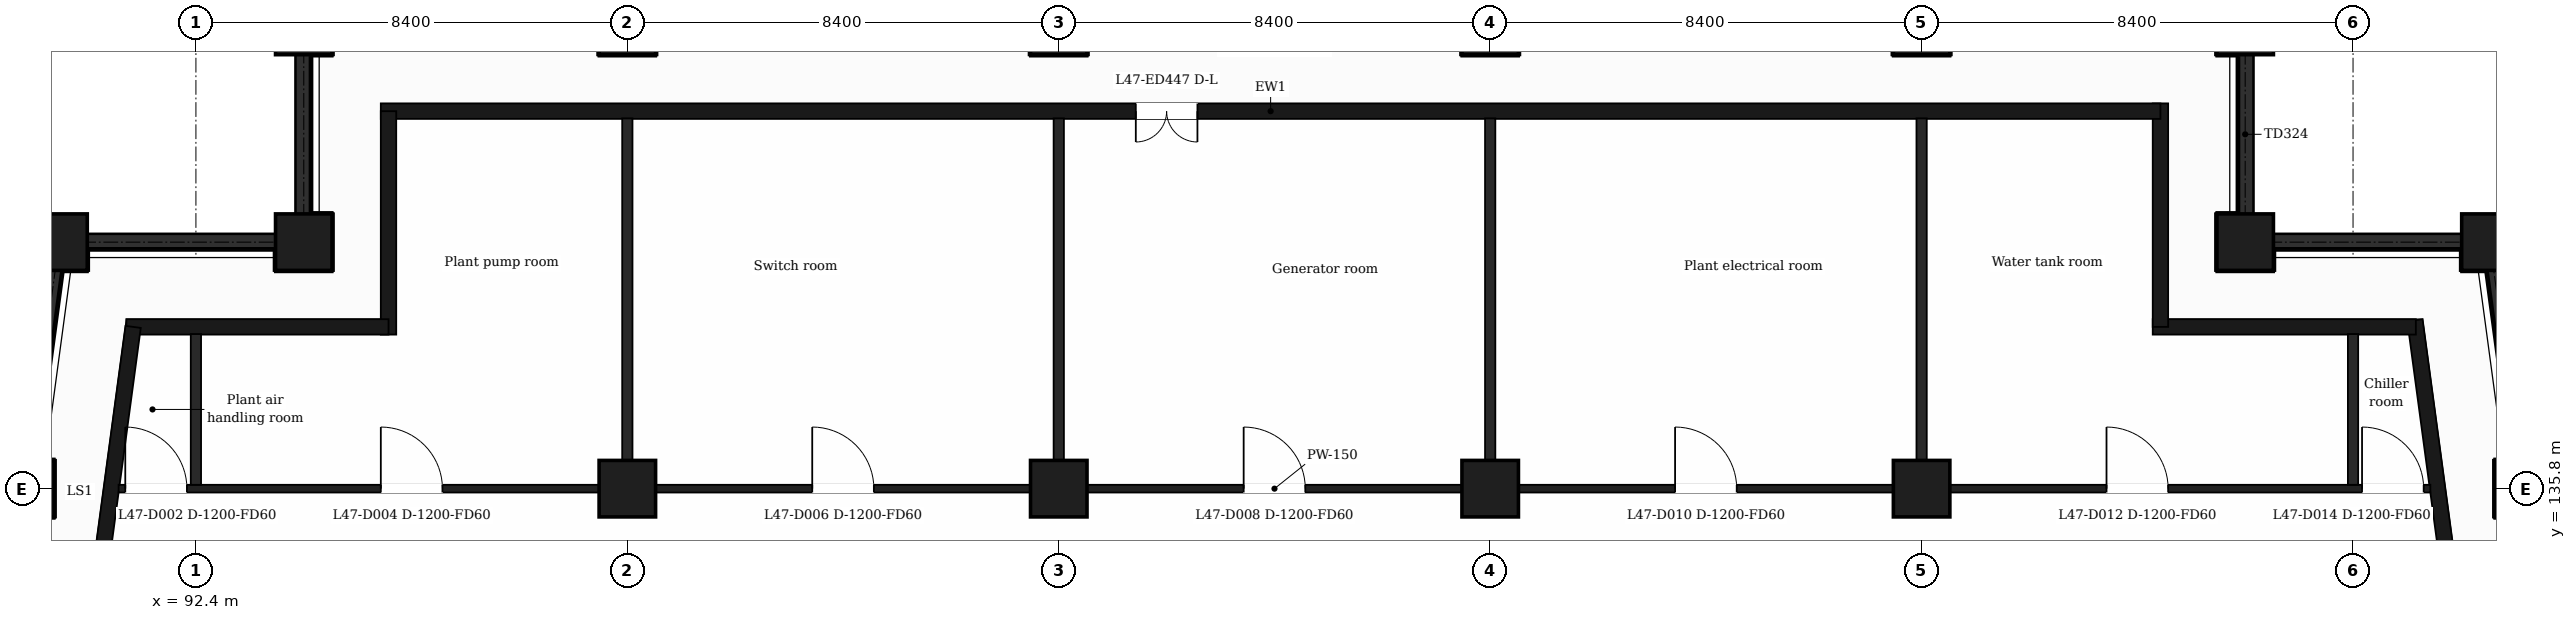
"""IFC4 building model, lengths in metres.
Left out: names, types, materials, properties, quantities, classifications, styles, units other than length and angle.
Written with IfcOpenShell. Run it as: python <this file> out.ifc"""

import sys

from ifc_helpers import new_model, si_unit, direction, frame, frame_2d, origin, origin_2d, place, context, subcontext, project, spatial, rectangle, extrude, element, fill, save


model = new_model("IFC4")
c1 = context("Model", 3, precision=1e-05, world=origin(), true_north=direction((0.0, 1.0)))
c2 = subcontext(c1, "Body", "Model", "MODEL_VIEW")
j1 = project(units=[si_unit("LENGTHUNIT", "METRE"), si_unit("PLANEANGLEUNIT", "RADIAN")], contexts=[c1])
p1 = place(None, origin())
s1 = spatial("IfcSite", under=j1, at=p1, CompositionType="ELEMENT")
p2 = place(p1, origin())
s2 = spatial("IfcBuilding", under=s1, at=p2, CompositionType="ELEMENT")
p3 = place(p2, frame((0.0, 0.0, 197.2)))
s3 = spatial("IfcBuildingStorey", under=s2, at=p3, CompositionType="ELEMENT", Elevation=197.2)
for number, where, z_axis, x_axis in (
    (1, (94.5, 140.6, 0.0), (0.0, 0.0, 1.0), (1.0, 0.0, 0.0)),
    (2, (132.3, 140.6, 0.0), (0.0, 0.0, 1.0), (1.0, 0.0, 0.0)),
    (3, (89.735, 140.6, 0.0), (0.0, 0.0, 1.0), (1.0, 0.0, 0.0)),
    (4, (137.065, 140.6, 0.0), (0.0, 0.0, 1.0), (1.0, 0.0, 0.0)),
    (5, (100.8, 135.8, 0.0), (0.0, 0.0, 1.0), (1.0, 0.0, 0.0)),
    (6, (109.2, 135.8, 0.0), (0.0, 0.0, 1.0), (1.0, 0.0, 0.0)),
    (7, (117.6, 135.8, 0.0), (0.0, 0.0, 1.0), (1.0, 0.0, 0.0)),
    (8, (126.0, 135.8, 0.0), (0.0, 0.0, 1.0), (1.0, 0.0, 0.0)),
    (9, (89.088, 135.8, 0.0), (0.0, 0.0, 1.0), (1.0, 0.0, 0.0)),
    (10, (137.711, 135.8, 0.0), (0.0, 0.0, 1.0), (1.0, 0.0, 0.0)),
    (11, (100.8, 144.8, 0.0), (0.0, 0.0, 1.0), (1.0, 0.0, 0.0)),
    (12, (109.2, 144.8, 0.0), (0.0, 0.0, 1.0), (1.0, 0.0, 0.0)),
    (13, (117.6, 144.8, 0.0), (0.0, 0.0, 1.0), (1.0, 0.0, 0.0)),
    (14, (126.0, 144.8, 0.0), (0.0, 0.0, 1.0), (1.0, 0.0, 0.0)),
    (15, (94.5, 144.8, 0.0), (0.0, 0.0, 1.0), (1.0, 0.0, 0.0)),
    (16, (132.3, 144.8, 0.0), (0.0, 0.0, 1.0), (1.0, 0.0, 0.0)),
):
    element("IfcColumn", number, at=place(p3, frame(where, z_axis=z_axis, x_axis=x_axis)), inside=s3, PredefinedType="COLUMN", context=c2, shape_type="SweptSolid", body=[
        extrude(rectangle(XDim=1.1, YDim=1.1, at=origin_2d()), origin(), (0.0, 0.0, 1.0), 5.0),
    ])
p4 = place(p3, frame((136.504, 132.4, 0.0), z_axis=(0.0, 0.0, 1.0), x_axis=(-0.133399697462, 0.99106231929, 0.0)))
e17 = element("IfcWall", 17, at=p4, inside=s3, PredefinedType="SOLIDWALL", context=c2, shape_type="SweptSolid", body=[
    extrude(rectangle(XDim=6.74, YDim=0.3, at=frame_2d((3.37, 0.0))), origin(), (0.0, 0.0, 1.0), 4.68),
])
p5 = place(p4, frame((1.115, 0.0, 0.0)))
e18 = element("IfcOpeningElement", 18, at=p5, cuts=e17, PredefinedType="OPENING", context=c2, shape_type="SweptSolid", body=[
    extrude(rectangle(XDim=1.2, YDim=2.4, at=frame_2d((0.6, 1.2))), frame((0.0, 0.16, 0.0), z_axis=(0.0, -1.0, 0.0), x_axis=(1.0, 0.0, 0.0)), (0.0, 0.0, 1.0), 0.32),
])
p6 = place(p3, frame((135.623, 138.95, 0.0), z_axis=(0.0, 0.0, 1.0), x_axis=(-1.0, 0.0, 0.0)))
e19 = element("IfcWall", 19, at=p6, inside=s3, PredefinedType="SOLIDWALL", context=c2, shape_type="SweptSolid", body=[
    extrude(rectangle(XDim=5.123, YDim=0.3, at=frame_2d((2.561, 0.0))), origin(), (0.0, 0.0, 1.0), 4.68),
])
p7 = place(p3, frame((130.65, 138.95, 0.0), z_axis=(0.0, 0.0, 1.0), x_axis=(0.0, 1.0, 0.0)))
e20 = element("IfcWall", 20, at=p7, inside=s3, PredefinedType="SOLIDWALL", context=c2, shape_type="SweptSolid", body=[
    extrude(rectangle(XDim=4.35, YDim=0.3, at=frame_2d((2.175, 0.0))), origin(), (0.0, 0.0, 1.0), 4.68),
])
p8 = place(p3, frame((130.65, 143.15, 0.0), z_axis=(0.0, 0.0, 1.0), x_axis=(-1.0, 0.0, 0.0)))
e21 = element("IfcWall", 21, at=p8, inside=s3, PredefinedType="SOLIDWALL", context=c2, shape_type="SweptSolid", body=[
    extrude(rectangle(XDim=34.65, YDim=0.3, at=frame_2d((17.325, 0.0))), origin(), (0.0, 0.0, 1.0), 4.68),
])
p9 = place(p8, frame((18.75, 0.0, 0.0)))
e22 = element("IfcOpeningElement", 22, at=p9, cuts=e21, PredefinedType="OPENING", context=c2, shape_type="SweptSolid", body=[
    extrude(rectangle(XDim=1.2, YDim=2.4, at=frame_2d((0.6, 1.2))), frame((0.0, 0.16, 0.0), z_axis=(0.0, -1.0, 0.0), x_axis=(1.0, 0.0, 0.0)), (0.0, 0.0, 1.0), 0.32),
])
p10 = place(p3, frame((96.15, 143.15, 0.0), z_axis=(0.0, 0.0, 1.0), x_axis=(0.0, -1.0, 0.0)))
e23 = element("IfcWall", 23, at=p10, inside=s3, PredefinedType="SOLIDWALL", context=c2, shape_type="SweptSolid", body=[
    extrude(rectangle(XDim=4.35, YDim=0.3, at=frame_2d((2.175, 0.0))), origin(), (0.0, 0.0, 1.0), 4.68),
])
p11 = place(p3, frame((96.15, 138.95, 0.0), z_axis=(0.0, 0.0, 1.0), x_axis=(-1.0, 0.0, 0.0)))
e24 = element("IfcWall", 24, at=p11, inside=s3, PredefinedType="SOLIDWALL", context=c2, shape_type="SweptSolid", body=[
    extrude(rectangle(XDim=5.104, YDim=0.3, at=frame_2d((2.552, 0.0))), origin(), (0.0, 0.0, 1.0), 4.68),
])
p12 = place(p3, frame((91.177, 138.95, 0.0), z_axis=(0.0, 0.0, 1.0), x_axis=(-0.133426664613, -0.991058689065, 0.0)))
e25 = element("IfcWall", 25, at=p12, inside=s3, PredefinedType="SOLIDWALL", context=c2, shape_type="SweptSolid", body=[
    extrude(rectangle(XDim=6.609, YDim=0.3, at=frame_2d((3.305, 0.0))), origin(), (0.0, 0.0, 1.0), 4.68),
])
p13 = place(p12, frame((4.294, 0.0, 0.0)))
e26 = element("IfcOpeningElement", 26, at=p13, cuts=e25, PredefinedType="OPENING", context=c2, shape_type="SweptSolid", body=[
    extrude(rectangle(XDim=1.2, YDim=2.4, at=frame_2d((0.6, 1.2))), frame((0.0, 0.16, 0.0), z_axis=(0.0, -1.0, 0.0), x_axis=(1.0, 0.0, 0.0)), (0.0, 0.0, 1.0), 0.32),
])
p14 = place(p3, frame((90.895, 135.8, 0.0), z_axis=(0.0, 0.0, 1.0), x_axis=(1.0, 0.0, 0.0)))
e27 = element("IfcWall", 27, at=p14, inside=s3, PredefinedType="PARTITIONING", context=c2, shape_type="SweptSolid", body=[
    extrude(rectangle(XDim=45.011, YDim=0.15, at=frame_2d((22.505, 0.0))), origin(), (0.0, 0.0, 1.0), 4.68),
])
p15 = place(p14, frame((0.13, 0.0, 0.0)))
e28 = element("IfcOpeningElement", 28, at=p15, cuts=e27, PredefinedType="OPENING", context=c2, shape_type="SweptSolid", body=[
    extrude(rectangle(XDim=1.2, YDim=2.1, at=frame_2d((0.6, 1.05))), frame((0.0, 0.085, 0.0), z_axis=(0.0, -1.0, 0.0), x_axis=(1.0, 0.0, 0.0)), (0.0, 0.0, 1.0), 0.17),
])
p16 = place(p14, frame((5.105, 0.0, 0.0)))
e29 = element("IfcOpeningElement", 29, at=p16, cuts=e27, PredefinedType="OPENING", context=c2, shape_type="SweptSolid", body=[
    extrude(rectangle(XDim=1.2, YDim=2.1, at=frame_2d((0.6, 1.05))), frame((0.0, 0.085, 0.0), z_axis=(0.0, -1.0, 0.0), x_axis=(1.0, 0.0, 0.0)), (0.0, 0.0, 1.0), 0.17),
])
p17 = place(p14, frame((13.505, 0.0, 0.0)))
e30 = element("IfcOpeningElement", 30, at=p17, cuts=e27, PredefinedType="OPENING", context=c2, shape_type="SweptSolid", body=[
    extrude(rectangle(XDim=1.2, YDim=2.1, at=frame_2d((0.6, 1.05))), frame((0.0, 0.085, 0.0), z_axis=(0.0, -1.0, 0.0), x_axis=(1.0, 0.0, 0.0)), (0.0, 0.0, 1.0), 0.17),
])
p18 = place(p14, frame((21.906, 0.0, 0.0)))
e31 = element("IfcOpeningElement", 31, at=p18, cuts=e27, PredefinedType="OPENING", context=c2, shape_type="SweptSolid", body=[
    extrude(rectangle(XDim=1.2, YDim=2.1, at=frame_2d((0.6, 1.05))), frame((0.0, 0.085, 0.0), z_axis=(0.0, -1.0, 0.0), x_axis=(1.0, 0.0, 0.0)), (0.0, 0.0, 1.0), 0.17),
])
p19 = place(p14, frame((30.305, 0.0, 0.0)))
e32 = element("IfcOpeningElement", 32, at=p19, cuts=e27, PredefinedType="OPENING", context=c2, shape_type="SweptSolid", body=[
    extrude(rectangle(XDim=1.2, YDim=2.1, at=frame_2d((0.6, 1.05))), frame((0.0, 0.085, 0.0), z_axis=(0.0, -1.0, 0.0), x_axis=(1.0, 0.0, 0.0)), (0.0, 0.0, 1.0), 0.17),
])
p20 = place(p14, frame((38.705, 0.0, 0.0)))
e33 = element("IfcOpeningElement", 33, at=p20, cuts=e27, PredefinedType="OPENING", context=c2, shape_type="SweptSolid", body=[
    extrude(rectangle(XDim=1.2, YDim=2.1, at=frame_2d((0.6, 1.05))), frame((0.0, 0.085, 0.0), z_axis=(0.0, -1.0, 0.0), x_axis=(1.0, 0.0, 0.0)), (0.0, 0.0, 1.0), 0.17),
])
p21 = place(p14, frame((43.681, 0.0, 0.0)))
e34 = element("IfcOpeningElement", 34, at=p21, cuts=e27, PredefinedType="OPENING", context=c2, shape_type="SweptSolid", body=[
    extrude(rectangle(XDim=1.2, YDim=2.1, at=frame_2d((0.6, 1.05))), frame((0.0, 0.085, 0.0), z_axis=(0.0, -1.0, 0.0), x_axis=(1.0, 0.0, 0.0)), (0.0, 0.0, 1.0), 0.17),
])
p22 = place(p3, frame((92.4, 135.875, 0.0), z_axis=(0.0, 0.0, 1.0), x_axis=(0.0, 1.0, 0.0)))
e35 = element("IfcWall", 35, at=p22, inside=s3, PredefinedType="PARTITIONING", context=c2, shape_type="SweptSolid", body=[
    extrude(rectangle(XDim=2.935, YDim=0.2, at=frame_2d((1.468, 0.0))), origin(), (0.0, 0.0, 1.0), 4.68),
])
for number, where, z_axis, x_axis in (
    (36, (100.8, 135.875, 0.0), (0.0, 0.0, 1.0), (0.0, 1.0, 0.0)),
    (37, (109.2, 135.875, 0.0), (0.0, 0.0, 1.0), (0.0, 1.0, 0.0)),
    (38, (117.6, 135.875, 0.0), (0.0, 0.0, 1.0), (0.0, 1.0, 0.0)),
    (39, (126.0, 135.875, 0.0), (0.0, 0.0, 1.0), (0.0, 1.0, 0.0)),
):
    element("IfcWall", number, at=place(p3, frame(where, z_axis=z_axis, x_axis=x_axis)), inside=s3, PredefinedType="PARTITIONING", context=c2, shape_type="SweptSolid", body=[
        extrude(rectangle(XDim=7.135, YDim=0.2, at=frame_2d((3.567, 0.0))), origin(), (0.0, 0.0, 1.0), 4.68),
    ])
p23 = place(p3, frame((134.4, 135.875, 0.0), z_axis=(0.0, 0.0, 1.0), x_axis=(0.0, 1.0, 0.0)))
e40 = element("IfcWall", 40, at=p23, inside=s3, PredefinedType="PARTITIONING", context=c2, shape_type="SweptSolid", body=[
    extrude(rectangle(XDim=2.935, YDim=0.2, at=frame_2d((1.468, 0.0))), origin(), (0.0, 0.0, 1.0), 4.68),
])
p24 = place(p9, origin())
e41 = element("IfcDoor", 41, at=p24, inside=s3, OperationType="DOUBLE_DOOR_SINGLE_SWING", PredefinedType="DOOR", context=c2, shape_type="SweptSolid", body=[
    extrude(rectangle(XDim=1.2, YDim=2.4, at=frame_2d((0.6, 1.2))), frame((0.0, 0.025, 0.0), z_axis=(0.0, -1.0, 0.0), x_axis=(1.0, 0.0, 0.0)), (0.0, 0.0, 1.0), 0.05),
])
fill(e22, e41)
p25 = place(p15, origin())
e42 = element("IfcDoor", 42, at=p25, inside=s3, OperationType="SINGLE_SWING_LEFT", PredefinedType="DOOR", context=c2, shape_type="SweptSolid", body=[
    extrude(rectangle(XDim=1.2, YDim=2.1, at=frame_2d((0.6, 1.05))), frame((0.0, 0.025, 0.0), z_axis=(0.0, -1.0, 0.0), x_axis=(1.0, 0.0, 0.0)), (0.0, 0.0, 1.0), 0.05),
])
fill(e28, e42)
p26 = place(p16, origin())
e43 = element("IfcDoor", 43, at=p26, inside=s3, OperationType="SINGLE_SWING_LEFT", PredefinedType="DOOR", context=c2, shape_type="SweptSolid", body=[
    extrude(rectangle(XDim=1.2, YDim=2.1, at=frame_2d((0.6, 1.05))), frame((0.0, 0.025, 0.0), z_axis=(0.0, -1.0, 0.0), x_axis=(1.0, 0.0, 0.0)), (0.0, 0.0, 1.0), 0.05),
])
fill(e29, e43)
p27 = place(p17, origin())
e44 = element("IfcDoor", 44, at=p27, inside=s3, OperationType="SINGLE_SWING_LEFT", PredefinedType="DOOR", context=c2, shape_type="SweptSolid", body=[
    extrude(rectangle(XDim=1.2, YDim=2.1, at=frame_2d((0.6, 1.05))), frame((0.0, 0.025, 0.0), z_axis=(0.0, -1.0, 0.0), x_axis=(1.0, 0.0, 0.0)), (0.0, 0.0, 1.0), 0.05),
])
fill(e30, e44)
p28 = place(p18, origin())
e45 = element("IfcDoor", 45, at=p28, inside=s3, OperationType="SINGLE_SWING_LEFT", PredefinedType="DOOR", context=c2, shape_type="SweptSolid", body=[
    extrude(rectangle(XDim=1.2, YDim=2.1, at=frame_2d((0.6, 1.05))), frame((0.0, 0.025, 0.0), z_axis=(0.0, -1.0, 0.0), x_axis=(1.0, 0.0, 0.0)), (0.0, 0.0, 1.0), 0.05),
])
fill(e31, e45)
p29 = place(p19, origin())
e46 = element("IfcDoor", 46, at=p29, inside=s3, OperationType="SINGLE_SWING_LEFT", PredefinedType="DOOR", context=c2, shape_type="SweptSolid", body=[
    extrude(rectangle(XDim=1.2, YDim=2.1, at=frame_2d((0.6, 1.05))), frame((0.0, 0.025, 0.0), z_axis=(0.0, -1.0, 0.0), x_axis=(1.0, 0.0, 0.0)), (0.0, 0.0, 1.0), 0.05),
])
fill(e32, e46)
p30 = place(p20, origin())
e47 = element("IfcDoor", 47, at=p30, inside=s3, OperationType="SINGLE_SWING_LEFT", PredefinedType="DOOR", context=c2, shape_type="SweptSolid", body=[
    extrude(rectangle(XDim=1.2, YDim=2.1, at=frame_2d((0.6, 1.05))), frame((0.0, 0.025, 0.0), z_axis=(0.0, -1.0, 0.0), x_axis=(1.0, 0.0, 0.0)), (0.0, 0.0, 1.0), 0.05),
])
fill(e33, e47)
p31 = place(p21, origin())
e48 = element("IfcDoor", 48, at=p31, inside=s3, OperationType="SINGLE_SWING_LEFT", PredefinedType="DOOR", context=c2, shape_type="SweptSolid", body=[
    extrude(rectangle(XDim=1.2, YDim=2.1, at=frame_2d((0.6, 1.05))), frame((0.0, 0.025, 0.0), z_axis=(0.0, -1.0, 0.0), x_axis=(1.0, 0.0, 0.0)), (0.0, 0.0, 1.0), 0.05),
])
fill(e34, e48)
save(model, sys.argv[1])
